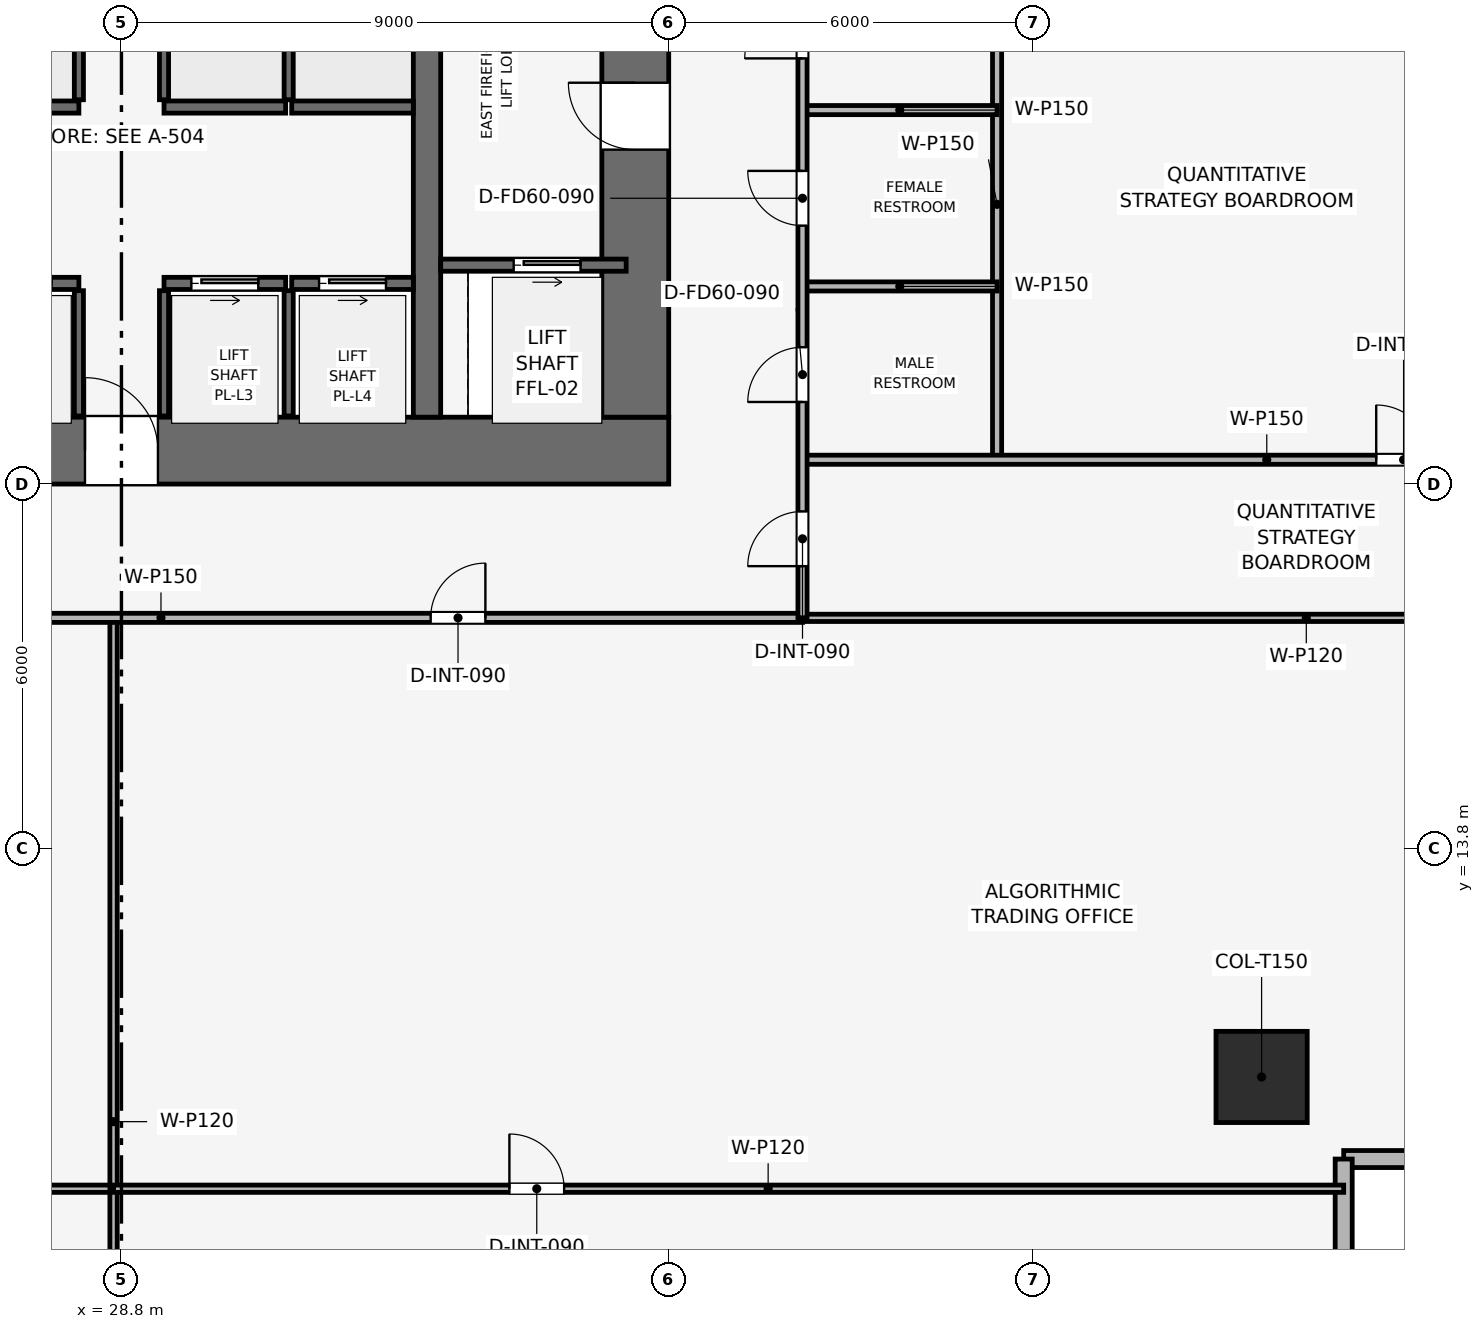
"""IFC4 building model, lengths in metres.
Left out: names, types, materials, properties, quantities, classifications, styles, units other than length and angle.
Written with IfcOpenShell. Run it as: python <this file> out.ifc"""

import sys

from ifc_helpers import new_model, si_unit, direction, frame, frame_2d, origin, origin_2d, place, context, subcontext, project, spatial, rectangle, extrude, element, fill, save


model = new_model("IFC4")
c1 = context("Model", 3, precision=1e-05, world=origin(), true_north=direction((0.0, 1.0)))
c2 = subcontext(c1, "Body", "Model", "MODEL_VIEW")
j1 = project(units=[si_unit("LENGTHUNIT", "METRE"), si_unit("PLANEANGLEUNIT", "RADIAN")], contexts=[c1])
p1 = place(None, origin())
s1 = spatial("IfcSite", under=j1, at=p1, CompositionType="ELEMENT")
p2 = place(p1, origin())
s2 = spatial("IfcBuilding", under=s1, at=p2, CompositionType="ELEMENT")
p3 = place(p2, frame((0.0, 0.0, 33.9)))
s3 = spatial("IfcBuildingStorey", under=s2, at=p3, CompositionType="ELEMENT", Elevation=33.9)
p4 = place(p3, frame((19.8, 20.35, 0.0), z_axis=(0.0, 0.0, 1.0), x_axis=(1.0, 0.0, 0.0)))
e1 = element("IfcWall", 1, at=p4, inside=s3, PredefinedType="SHEAR", context=c2, shape_type="SweptSolid", body=[
    extrude(rectangle(XDim=18.0, YDim=1.1, at=frame_2d((9.0, 0.0))), origin(), (0.0, 0.0, 1.0), 3.9),
])
p5 = place(p4, frame((8.4, 0.0, 0.0)))
e2 = element("IfcOpeningElement", 2, at=p5, cuts=e1, PredefinedType="OPENING", context=c2, shape_type="SweptSolid", body=[
    extrude(rectangle(XDim=1.2, YDim=2.2, at=frame_2d((0.6, 1.1))), frame((0.0, 0.56, 0.0), z_axis=(0.0, -1.0, 0.0), x_axis=(1.0, 0.0, 0.0)), (0.0, 0.0, 1.0), 1.12),
])
p6 = place(p3, frame((37.25, 20.9, 0.0), z_axis=(0.0, 0.0, 1.0), x_axis=(0.0, 1.0, 0.0)))
e3 = element("IfcWall", 3, at=p6, inside=s3, PredefinedType="SHEAR", context=c2, shape_type="SweptSolid", body=[
    extrude(rectangle(XDim=15.8, YDim=1.1, at=frame_2d((7.9, 0.0))), origin(), (0.0, 0.0, 1.0), 3.9),
])
p7 = place(p6, frame((4.4, 0.0, 0.0)))
e4 = element("IfcOpeningElement", 4, at=p7, cuts=e3, PredefinedType="OPENING", context=c2, shape_type="SweptSolid", body=[
    extrude(rectangle(XDim=1.1, YDim=2.15, at=frame_2d((0.55, 1.075))), frame((0.0, 0.56, 0.0), z_axis=(0.0, -1.0, 0.0), x_axis=(1.0, 0.0, 0.0)), (0.0, 0.0, 1.0), 1.12),
])
p8 = place(p3, frame((33.825, 20.9, 0.0), z_axis=(0.0, 0.0, 1.0), x_axis=(0.0, 1.0, 0.0)))
e5 = element("IfcWall", 5, at=p8, inside=s3, PredefinedType="SHEAR", context=c2, shape_type="SweptSolid", body=[
    extrude(rectangle(XDim=15.8, YDim=0.45, at=frame_2d((7.9, 0.0))), origin(), (0.0, 0.0, 1.0), 3.9),
])
p9 = place(p3, frame((47.55, 10.05, 0.003), z_axis=(0.0, 0.0, 1.0), x_axis=(1.0, 0.0, 0.0)))
e6 = element("IfcColumn", 6, at=p9, inside=s3, PredefinedType="COLUMN", context=c2, shape_type="SweptSolid", body=[
    extrude(rectangle(XDim=1.5, YDim=1.5, at=origin_2d()), origin(), (0.0, 0.0, 1.0), 3.644),
])
p10 = place(p3, frame((56.57, 8.7, 0.0), z_axis=(0.0, 0.0, 1.0), x_axis=(-1.0, 0.0, 0.0)))
e7 = element("IfcWall", 7, at=p10, inside=s3, PredefinedType="SOLIDWALL", context=c2, shape_type="SweptSolid", body=[
    extrude(rectangle(XDim=7.67, YDim=0.28, at=frame_2d((3.835, 0.0))), origin(), (0.0, 0.0, 1.0), 3.65),
])
p11 = place(p10, frame((2.585, 0.0, 0.9)))
e8 = element("IfcOpeningElement", 8, at=p11, cuts=e7, PredefinedType="OPENING", context=c2, shape_type="SweptSolid", body=[
    extrude(rectangle(XDim=2.5, YDim=1.9, at=frame_2d((1.25, 0.95))), frame((0.0, 0.15, 0.0), z_axis=(0.0, -1.0, 0.0), x_axis=(1.0, 0.0, 0.0)), (0.0, 0.0, 1.0), 0.3),
])
p12 = place(p3, frame((48.9, 8.7, 0.0), z_axis=(0.0, 0.0, 1.0), x_axis=(0.0, -1.0, 0.0)))
e9 = element("IfcWall", 9, at=p12, inside=s3, PredefinedType="SOLIDWALL", context=c2, shape_type="SweptSolid", body=[
    extrude(rectangle(XDim=7.67, YDim=0.28, at=frame_2d((3.835, 0.0))), origin(), (0.0, 0.0, 1.0), 3.65),
])
p13 = place(p12, frame((2.585, 0.0, 0.9)))
e10 = element("IfcOpeningElement", 10, at=p13, cuts=e9, PredefinedType="OPENING", context=c2, shape_type="SweptSolid", body=[
    extrude(rectangle(XDim=2.5, YDim=1.9, at=frame_2d((1.25, 0.95))), frame((0.0, 0.15, 0.0), z_axis=(0.0, -1.0, 0.0), x_axis=(1.0, 0.0, 0.0)), (0.0, 0.0, 1.0), 0.3),
])
p14 = place(p3, frame((34.05, 23.4, 0.0), z_axis=(0.0, 0.0, 1.0), x_axis=(1.0, 0.0, 0.0)))
e11 = element("IfcWall", 11, at=p14, inside=s3, PredefinedType="SHEAR", context=c2, shape_type="SweptSolid", body=[
    extrude(rectangle(XDim=3.05, YDim=0.2, at=frame_2d((1.525, 0.0))), origin(), (0.0, 0.0, 1.0), 3.65),
])
p15 = place(p14, frame((1.2, 0.0, 0.0)))
e12 = element("IfcOpeningElement", 12, at=p15, cuts=e11, PredefinedType="OPENING", context=c2, shape_type="SweptSolid", body=[
    extrude(rectangle(XDim=1.1, YDim=2.15, at=frame_2d((0.55, 1.075))), frame((0.0, 0.11, 0.0), z_axis=(0.0, -1.0, 0.0), x_axis=(1.0, 0.0, 0.0)), (0.0, 0.0, 1.0), 0.22),
])
p16 = place(p3, frame((26.1, 23.1, 0.0), z_axis=(0.0, 0.0, 1.0), x_axis=(1.0, 0.0, 0.0)))
e13 = element("IfcWall", 13, at=p16, inside=s3, PredefinedType="SHEAR", context=c2, shape_type="SweptSolid", body=[
    extrude(rectangle(XDim=2.0, YDim=0.2, at=frame_2d((1.0, 0.0))), origin(), (0.0, 0.0, 1.0), 3.65),
])
p17 = place(p16, frame((0.45, 0.0, 0.0)))
e14 = element("IfcOpeningElement", 14, at=p17, cuts=e13, PredefinedType="OPENING", context=c2, shape_type="SweptSolid", body=[
    extrude(rectangle(XDim=1.1, YDim=2.15, at=frame_2d((0.55, 1.075))), frame((0.0, 0.11, 0.0), z_axis=(0.0, -1.0, 0.0), x_axis=(1.0, 0.0, 0.0)), (0.0, 0.0, 1.0), 0.22),
])
p18 = place(p3, frame((29.5, 23.1, 0.0), z_axis=(0.0, 0.0, 1.0), x_axis=(1.0, 0.0, 0.0)))
e15 = element("IfcWall", 15, at=p18, inside=s3, PredefinedType="SHEAR", context=c2, shape_type="SweptSolid", body=[
    extrude(rectangle(XDim=2.0, YDim=0.2, at=frame_2d((1.0, 0.0))), origin(), (0.0, 0.0, 1.0), 3.65),
])
p19 = place(p18, frame((0.45, 0.0, 0.0)))
e16 = element("IfcOpeningElement", 16, at=p19, cuts=e15, PredefinedType="OPENING", context=c2, shape_type="SweptSolid", body=[
    extrude(rectangle(XDim=1.1, YDim=2.15, at=frame_2d((0.55, 1.075))), frame((0.0, 0.11, 0.0), z_axis=(0.0, -1.0, 0.0), x_axis=(1.0, 0.0, 0.0)), (0.0, 0.0, 1.0), 0.22),
])
p20 = place(p3, frame((31.6, 23.1, 0.0), z_axis=(0.0, 0.0, 1.0), x_axis=(1.0, 0.0, 0.0)))
e17 = element("IfcWall", 17, at=p20, inside=s3, PredefinedType="SHEAR", context=c2, shape_type="SweptSolid", body=[
    extrude(rectangle(XDim=2.0, YDim=0.2, at=frame_2d((1.0, 0.0))), origin(), (0.0, 0.0, 1.0), 3.65),
])
p21 = place(p20, frame((0.45, 0.0, 0.0)))
e18 = element("IfcOpeningElement", 18, at=p21, cuts=e17, PredefinedType="OPENING", context=c2, shape_type="SweptSolid", body=[
    extrude(rectangle(XDim=1.1, YDim=2.15, at=frame_2d((0.55, 1.075))), frame((0.0, 0.11, 0.0), z_axis=(0.0, -1.0, 0.0), x_axis=(1.0, 0.0, 0.0)), (0.0, 0.0, 1.0), 0.22),
])
for number, where, z_axis, x_axis in (
    (19, (26.1, 26.0, 0.0), (0.0, 0.0, 1.0), (1.0, 0.0, 0.0)),
    (20, (29.5, 26.0, 0.0), (0.0, 0.0, 1.0), (1.0, 0.0, 0.0)),
    (21, (31.6, 26.0, 0.0), (0.0, 0.0, 1.0), (1.0, 0.0, 0.0)),
):
    element("IfcWall", number, at=place(p3, frame(where, z_axis=z_axis, x_axis=x_axis)), inside=s3, PredefinedType="SHEAR", context=c2, shape_type="SweptSolid", body=[
        extrude(rectangle(XDim=2.0, YDim=0.2, at=frame_2d((1.0, 0.0))), origin(), (0.0, 0.0, 1.0), 3.65),
    ])
for number, where, z_axis, x_axis in (
    (22, (28.1, 20.92, 0.0), (0.0, 0.0, 1.0), (0.0, 1.0, 0.0)),
    (23, (29.5, 20.92, 0.0), (0.0, 0.0, 1.0), (0.0, 1.0, 0.0)),
    (24, (31.55, 20.92, 0.0), (0.0, 0.0, 1.0), (0.0, 1.0, 0.0)),
):
    element("IfcWall", number, at=place(p3, frame(where, z_axis=z_axis, x_axis=x_axis)), inside=s3, PredefinedType="SHEAR", context=c2, shape_type="SweptSolid", body=[
        extrude(rectangle(XDim=2.06, YDim=0.15, at=frame_2d((1.03, 0.0))), origin(), (0.0, 0.0, 1.0), 3.65),
    ])
for number, where, z_axis, x_axis in (
    (25, (28.1, 26.12, 0.0), (0.0, 0.0, 1.0), (0.0, 1.0, 0.0)),
    (26, (29.5, 26.12, 0.0), (0.0, 0.0, 1.0), (0.0, 1.0, 0.0)),
    (27, (31.55, 26.12, 0.0), (0.0, 0.0, 1.0), (0.0, 1.0, 0.0)),
):
    element("IfcWall", number, at=place(p3, frame(where, z_axis=z_axis, x_axis=x_axis)), inside=s3, PredefinedType="SHEAR", context=c2, shape_type="SweptSolid", body=[
        extrude(rectangle(XDim=2.28, YDim=0.15, at=frame_2d((1.14, 0.0))), origin(), (0.0, 0.0, 1.0), 3.65),
    ])
p22 = place(p3, frame((19.939, 8.212, 0.0), z_axis=(0.0, 0.0, 1.0), x_axis=(1.0, 0.0, 0.0)))
e28 = element("IfcWall", 28, at=p22, inside=s3, PredefinedType="PARTITIONING", context=c2, shape_type="SweptSolid", body=[
    extrude(rectangle(XDim=8.731, YDim=0.12, at=frame_2d((4.365, 0.0))), origin(), (0.0, 0.0, 1.0), 3.085),
])
p23 = place(p22, frame((1.439, 0.0, 0.0)))
e29 = element("IfcOpeningElement", 29, at=p23, cuts=e28, PredefinedType="OPENING", context=c2, shape_type="SweptSolid", body=[
    extrude(rectangle(XDim=0.9, YDim=2.1, at=frame_2d((0.45, 1.05))), frame((0.0, 0.07, 0.0), z_axis=(0.0, -1.0, 0.0), x_axis=(1.0, 0.0, 0.0)), (0.0, 0.0, 1.0), 0.14),
])
p24 = place(p3, frame((28.67, 1.03, 0.0), z_axis=(0.0, 0.0, 1.0), x_axis=(0.0, 1.0, 0.0)))
e30 = element("IfcWall", 30, at=p24, inside=s3, PredefinedType="PARTITIONING", context=c2, shape_type="SweptSolid", body=[
    extrude(rectangle(XDim=16.57, YDim=0.12, at=frame_2d((8.285, 0.0))), origin(), (0.0, 0.0, 1.0), 3.085),
])
p25 = place(p3, frame((28.67, 8.212, 0.0), z_axis=(0.0, 0.0, 1.0), x_axis=(1.0, 0.0, 0.0)))
e31 = element("IfcWall", 31, at=p25, inside=s3, PredefinedType="PARTITIONING", context=c2, shape_type="SweptSolid", body=[
    extrude(rectangle(XDim=20.23, YDim=0.12, at=frame_2d((10.115, 0.0))), origin(), (0.0, 0.0, 1.0), 2.935),
])
p26 = place(p25, frame((6.51, 0.0, 0.0)))
e32 = element("IfcOpeningElement", 32, at=p26, cuts=e31, PredefinedType="OPENING", context=c2, shape_type="SweptSolid", body=[
    extrude(rectangle(XDim=0.9, YDim=2.1, at=frame_2d((0.45, 1.05))), frame((0.0, 0.07, 0.0), z_axis=(0.0, -1.0, 0.0), x_axis=(1.0, 0.0, 0.0)), (0.0, 0.0, 1.0), 0.14),
])
p27 = place(p3, frame((40.0, 17.6, 0.0), z_axis=(0.0, 0.0, 1.0), x_axis=(1.0, 0.0, 0.0)))
e33 = element("IfcWall", 33, at=p27, inside=s3, PredefinedType="PARTITIONING", context=c2, shape_type="SweptSolid", body=[
    extrude(rectangle(XDim=16.57, YDim=0.12, at=frame_2d((8.285, 0.0))), origin(), (0.0, 0.0, 1.0), 2.935),
])
p28 = place(p3, frame((43.2, 20.2, 0.0), z_axis=(0.0, 0.0, 1.0), x_axis=(0.0, 1.0, 0.0)))
e34 = element("IfcWall", 34, at=p28, inside=s3, PredefinedType="PARTITIONING", context=c2, shape_type="SweptSolid", body=[
    extrude(rectangle(XDim=8.4, YDim=0.15, at=frame_2d((4.2, 0.0))), origin(), (0.0, 0.0, 1.0), 3.085),
])
p29 = place(p3, frame((40.0, 20.2, 0.0), z_axis=(0.0, 0.0, 1.0), x_axis=(1.0, 0.0, 0.0)))
e35 = element("IfcWall", 35, at=p29, inside=s3, PredefinedType="PARTITIONING", context=c2, shape_type="SweptSolid", body=[
    extrude(rectangle(XDim=16.57, YDim=0.15, at=frame_2d((8.285, 0.0))), origin(), (0.0, 0.0, 1.0), 2.935),
])
p30 = place(p29, frame((9.435, 0.0, 0.0)))
e36 = element("IfcOpeningElement", 36, at=p30, cuts=e35, PredefinedType="OPENING", context=c2, shape_type="SweptSolid", body=[
    extrude(rectangle(XDim=0.9, YDim=2.1, at=frame_2d((0.45, 1.05))), frame((0.0, 0.085, 0.0), z_axis=(0.0, -1.0, 0.0), x_axis=(1.0, 0.0, 0.0)), (0.0, 0.0, 1.0), 0.17),
])
for number, where, z_axis, x_axis in (
    (37, (40.0, 23.05, 0.0), (0.0, 0.0, 1.0), (1.0, 0.0, 0.0)),
    (38, (40.0, 25.95, 0.0), (0.0, 0.0, 1.0), (1.0, 0.0, 0.0)),
):
    element("IfcWall", number, at=place(p3, frame(where, z_axis=z_axis, x_axis=x_axis)), inside=s3, PredefinedType="PARTITIONING", context=c2, shape_type="SweptSolid", body=[
        extrude(rectangle(XDim=3.2, YDim=0.15, at=frame_2d((1.6, 0.0))), origin(), (0.0, 0.0, 1.0), 3.65),
    ])
p31 = place(p3, frame((17.6, 17.6, 0.0), z_axis=(0.0, 0.0, 1.0), x_axis=(1.0, 0.0, 0.0)))
e39 = element("IfcWall", 39, at=p31, inside=s3, PredefinedType="PARTITIONING", context=c2, shape_type="SweptSolid", body=[
    extrude(rectangle(XDim=22.4, YDim=0.15, at=frame_2d((11.2, 0.0))), origin(), (0.0, 0.0, 1.0), 3.085),
])
p32 = place(p31, frame((0.72, 0.0, 0.0)))
e40 = element("IfcOpeningElement", 40, at=p32, cuts=e39, PredefinedType="OPENING", context=c2, shape_type="SweptSolid", body=[
    extrude(rectangle(XDim=0.9, YDim=2.1, at=frame_2d((0.45, 1.05))), frame((0.0, 0.085, 0.0), z_axis=(0.0, -1.0, 0.0), x_axis=(1.0, 0.0, 0.0)), (0.0, 0.0, 1.0), 0.17),
])
p33 = place(p31, frame((6.255, 0.0, 0.0)))
e41 = element("IfcOpeningElement", 41, at=p33, cuts=e39, PredefinedType="OPENING", context=c2, shape_type="SweptSolid", body=[
    extrude(rectangle(XDim=0.9, YDim=2.1, at=frame_2d((0.45, 1.05))), frame((0.0, 0.085, 0.0), z_axis=(0.0, -1.0, 0.0), x_axis=(1.0, 0.0, 0.0)), (0.0, 0.0, 1.0), 0.17),
])
p34 = place(p31, frame((16.285, 0.0, 0.0)))
e42 = element("IfcOpeningElement", 42, at=p34, cuts=e39, PredefinedType="OPENING", context=c2, shape_type="SweptSolid", body=[
    extrude(rectangle(XDim=0.9, YDim=2.1, at=frame_2d((0.45, 1.05))), frame((0.0, 0.085, 0.0), z_axis=(0.0, -1.0, 0.0), x_axis=(1.0, 0.0, 0.0)), (0.0, 0.0, 1.0), 0.17),
])
p35 = place(p3, frame((40.0, 17.6, 0.0), z_axis=(0.0, 0.0, 1.0), x_axis=(0.0, 1.0, 0.0)))
e43 = element("IfcWall", 43, at=p35, inside=s3, PredefinedType="PARTITIONING", context=c2, shape_type="SweptSolid", body=[
    extrude(rectangle(XDim=22.4, YDim=0.15, at=frame_2d((11.2, 0.0))), origin(), (0.0, 0.0, 1.0), 3.085),
])
p36 = place(p35, frame((0.85, 0.0, 0.0)))
e44 = element("IfcOpeningElement", 44, at=p36, cuts=e43, PredefinedType="OPENING", context=c2, shape_type="SweptSolid", body=[
    extrude(rectangle(XDim=0.9, YDim=2.1, at=frame_2d((0.45, 1.05))), frame((0.0, 0.085, 0.0), z_axis=(0.0, -1.0, 0.0), x_axis=(1.0, 0.0, 0.0)), (0.0, 0.0, 1.0), 0.17),
])
p37 = place(p35, frame((3.55, 0.0, 0.0)))
e45 = element("IfcOpeningElement", 45, at=p37, cuts=e43, PredefinedType="OPENING", context=c2, shape_type="SweptSolid", body=[
    extrude(rectangle(XDim=0.9, YDim=2.1, at=frame_2d((0.45, 1.05))), frame((0.0, 0.085, 0.0), z_axis=(0.0, -1.0, 0.0), x_axis=(1.0, 0.0, 0.0)), (0.0, 0.0, 1.0), 0.17),
])
p38 = place(p35, frame((6.45, 0.0, 0.0)))
e46 = element("IfcOpeningElement", 46, at=p38, cuts=e43, PredefinedType="OPENING", context=c2, shape_type="SweptSolid", body=[
    extrude(rectangle(XDim=0.9, YDim=2.1, at=frame_2d((0.45, 1.05))), frame((0.0, 0.085, 0.0), z_axis=(0.0, -1.0, 0.0), x_axis=(1.0, 0.0, 0.0)), (0.0, 0.0, 1.0), 0.17),
])
p39 = place(p35, frame((9.2, 0.0, 0.0)))
e47 = element("IfcOpeningElement", 47, at=p39, cuts=e43, PredefinedType="OPENING", context=c2, shape_type="SweptSolid", body=[
    extrude(rectangle(XDim=0.95, YDim=2.1, at=frame_2d((0.475, 1.05))), frame((0.0, 0.085, 0.0), z_axis=(0.0, -1.0, 0.0), x_axis=(1.0, 0.0, 0.0)), (0.0, 0.0, 1.0), 0.17),
])
p40 = place(p35, frame((16.25, 0.0, 0.0)))
e48 = element("IfcOpeningElement", 48, at=p40, cuts=e43, PredefinedType="OPENING", context=c2, shape_type="SweptSolid", body=[
    extrude(rectangle(XDim=0.9, YDim=2.1, at=frame_2d((0.45, 1.05))), frame((0.0, 0.085, 0.0), z_axis=(0.0, -1.0, 0.0), x_axis=(1.0, 0.0, 0.0)), (0.0, 0.0, 1.0), 0.17),
])
p41 = place(p15, origin())
e49 = element("IfcDoor", 49, at=p41, inside=s3, OperationType="SLIDING_TO_RIGHT", PredefinedType="DOOR", context=c2, shape_type="SweptSolid", body=[
    extrude(rectangle(XDim=1.1, YDim=2.15, at=frame_2d((0.55, 1.075))), frame((0.0, 0.025, 0.0), z_axis=(0.0, -1.0, 0.0), x_axis=(1.0, 0.0, 0.0)), (0.0, 0.0, 1.0), 0.05),
])
fill(e12, e49)
p42 = place(p19, origin())
e50 = element("IfcDoor", 50, at=p42, inside=s3, OperationType="SLIDING_TO_RIGHT", PredefinedType="DOOR", context=c2, shape_type="SweptSolid", body=[
    extrude(rectangle(XDim=1.1, YDim=2.15, at=frame_2d((0.55, 1.075))), frame((0.0, 0.025, 0.0), z_axis=(0.0, -1.0, 0.0), x_axis=(1.0, 0.0, 0.0)), (0.0, 0.0, 1.0), 0.05),
])
fill(e16, e50)
p43 = place(p21, origin())
e51 = element("IfcDoor", 51, at=p43, inside=s3, OperationType="SLIDING_TO_RIGHT", PredefinedType="DOOR", context=c2, shape_type="SweptSolid", body=[
    extrude(rectangle(XDim=1.1, YDim=2.15, at=frame_2d((0.55, 1.075))), frame((0.0, 0.025, 0.0), z_axis=(0.0, -1.0, 0.0), x_axis=(1.0, 0.0, 0.0)), (0.0, 0.0, 1.0), 0.05),
])
fill(e18, e51)
p44 = place(p26, origin())
e52 = element("IfcDoor", 52, at=p44, inside=s3, OperationType="SINGLE_SWING_LEFT", PredefinedType="DOOR", context=c2, shape_type="SweptSolid", body=[
    extrude(rectangle(XDim=0.9, YDim=2.1, at=frame_2d((0.45, 1.05))), frame((0.0, 0.025, 0.0), z_axis=(0.0, -1.0, 0.0), x_axis=(1.0, 0.0, 0.0)), (0.0, 0.0, 1.0), 0.05),
])
fill(e32, e52)
p45 = place(p30, origin())
e53 = element("IfcDoor", 53, at=p45, inside=s3, OperationType="SINGLE_SWING_LEFT", PredefinedType="DOOR", context=c2, shape_type="SweptSolid", body=[
    extrude(rectangle(XDim=0.9, YDim=2.1, at=frame_2d((0.45, 1.05))), frame((0.0, 0.025, 0.0), z_axis=(0.0, -1.0, 0.0), x_axis=(1.0, 0.0, 0.0)), (0.0, 0.0, 1.0), 0.05),
])
fill(e36, e53)
p46 = place(p34, origin())
e54 = element("IfcDoor", 54, at=p46, inside=s3, OperationType="SINGLE_SWING_RIGHT", PredefinedType="DOOR", context=c2, shape_type="SweptSolid", body=[
    extrude(rectangle(XDim=0.9, YDim=2.1, at=frame_2d((0.45, 1.05))), frame((0.0, 0.025, 0.0), z_axis=(0.0, -1.0, 0.0), x_axis=(1.0, 0.0, 0.0)), (0.0, 0.0, 1.0), 0.05),
])
fill(e42, e54)
p47 = place(p36, origin())
e55 = element("IfcDoor", 55, at=p47, inside=s3, OperationType="SINGLE_SWING_LEFT", PredefinedType="DOOR", context=c2, shape_type="SweptSolid", body=[
    extrude(rectangle(XDim=0.9, YDim=2.1, at=frame_2d((0.45, 1.05))), frame((0.0, 0.025, 0.0), z_axis=(0.0, -1.0, 0.0), x_axis=(1.0, 0.0, 0.0)), (0.0, 0.0, 1.0), 0.05),
])
fill(e44, e55)
p48 = place(p37, origin())
e56 = element("IfcDoor", 56, at=p48, inside=s3, OperationType="SINGLE_SWING_LEFT", PredefinedType="DOOR", context=c2, shape_type="SweptSolid", body=[
    extrude(rectangle(XDim=0.9, YDim=2.1, at=frame_2d((0.45, 1.05))), frame((0.0, 0.025, 0.0), z_axis=(0.0, -1.0, 0.0), x_axis=(1.0, 0.0, 0.0)), (0.0, 0.0, 1.0), 0.05),
])
fill(e45, e56)
p49 = place(p38, origin())
e57 = element("IfcDoor", 57, at=p49, inside=s3, OperationType="SINGLE_SWING_RIGHT", PredefinedType="DOOR", context=c2, shape_type="SweptSolid", body=[
    extrude(rectangle(XDim=0.9, YDim=2.1, at=frame_2d((0.45, 1.05))), frame((0.0, 0.025, 0.0), z_axis=(0.0, -1.0, 0.0), x_axis=(1.0, 0.0, 0.0)), (0.0, 0.0, 1.0), 0.05),
])
fill(e46, e57)
p50 = place(p39, origin())
e58 = element("IfcDoor", 58, at=p50, inside=s3, OperationType="SINGLE_SWING_LEFT", PredefinedType="DOOR", context=c2, shape_type="SweptSolid", body=[
    extrude(rectangle(XDim=0.95, YDim=2.1, at=frame_2d((0.475, 1.05))), frame((0.0, 0.025, 0.0), z_axis=(0.0, -1.0, 0.0), x_axis=(1.0, 0.0, 0.0)), (0.0, 0.0, 1.0), 0.05),
])
fill(e47, e58)
p51 = place(p7, origin())
e59 = element("IfcDoor", 59, at=p51, inside=s3, OperationType="SINGLE_SWING_RIGHT", PredefinedType="DOOR", context=c2, shape_type="SweptSolid", body=[
    extrude(rectangle(XDim=1.1, YDim=2.15, at=frame_2d((0.55, 1.075))), frame((0.0, 0.025, 0.0), z_axis=(0.0, -1.0, 0.0), x_axis=(1.0, 0.0, 0.0)), (0.0, 0.0, 1.0), 0.05),
])
fill(e4, e59)
p52 = place(p5, origin())
e60 = element("IfcDoor", 60, at=p52, inside=s3, OperationType="SINGLE_SWING_LEFT", PredefinedType="DOOR", context=c2, shape_type="SweptSolid", body=[
    extrude(rectangle(XDim=1.2, YDim=2.2, at=frame_2d((0.6, 1.1))), frame((0.0, 0.025, 0.0), z_axis=(0.0, -1.0, 0.0), x_axis=(1.0, 0.0, 0.0)), (0.0, 0.0, 1.0), 0.05),
])
fill(e2, e60)
save(model, sys.argv[1])
